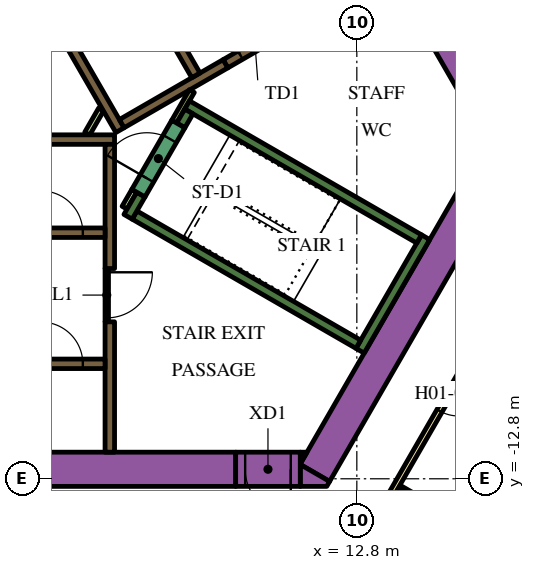
"""IFC4 building model, lengths in metres.
Left out: names, types, materials, properties, quantities, classifications, styles, units other than length and angle.
Written with IfcOpenShell. Run it as: python <this file> out.ifc"""

import sys

from ifc_helpers import new_model, si_unit, direction, frame, frame_2d, origin, place, context, subcontext, project, spatial, polyline, rectangle, outline, extrude, element, fill, save


model = new_model("IFC4")
c1 = context("Model", 3, precision=1e-05, world=origin(), true_north=direction((0.0, 1.0)))
c2 = subcontext(c1, "Body", "Model", "MODEL_VIEW")
j1 = project(units=[si_unit("LENGTHUNIT", "METRE"), si_unit("PLANEANGLEUNIT", "RADIAN")], contexts=[c1])
p1 = place(None, origin())
s1 = spatial("IfcSite", under=j1, at=p1, CompositionType="ELEMENT")
p2 = place(p1, origin())
s2 = spatial("IfcBuilding", under=s1, at=p2, CompositionType="ELEMENT")
p3 = place(p2, frame((0.0, 0.0, 35.4)))
s3 = spatial("IfcBuildingStorey", under=s2, at=p3, CompositionType="ELEMENT", Elevation=35.4)
p4 = place(p3, frame((6.711, 13.476, 0.0), z_axis=(0.0, 0.0, 1.0), x_axis=(0.500002723396, -0.866023831425, 0.0)))
e1 = element("IfcWall", 1, at=p4, inside=s3, PredefinedType="SOLIDWALL", context=c2, shape_type="SweptSolid", body=[
    extrude(rectangle(XDim=20.334, YDim=0.9, at=frame_2d((10.167, 0.0))), origin(), (0.0, 0.0, 1.0), 3.9),
])
p5 = place(p3, frame((11.695, -12.644, 0.0), z_axis=(0.0, 0.0, 1.0), x_axis=(0.500010229568, 0.86601949766, 0.0)))
e2 = element("IfcWall", 2, at=p5, inside=s3, PredefinedType="SOLIDWALL", context=c2, shape_type="SweptSolid", body=[
    extrude(rectangle(XDim=9.326, YDim=0.9, at=frame_2d((4.663, 0.0))), origin(), (0.0, 0.0, 1.0), 3.9),
])
p6 = place(p3, origin())
e3 = element("IfcWall", 3, at=p6, inside=s3, PredefinedType="SOLIDWALL", context=c2, shape_type="SweptSolid", body=[
    extrude(outline(polyline([(12.009, -13.0), (11.312, -13.0), (11.312, -12.425), (12.083, -12.871), (12.009, -13.0)])), origin(), (0.0, 0.0, 1.0), 3.9),
])
e4 = element("IfcWall", 4, at=p6, inside=s3, PredefinedType="SOLIDWALL", context=c2, shape_type="SweptSolid", body=[
    extrude(outline(polyline([(11.489, -12.1), (11.312, -12.407), (11.312, -12.1), (11.489, -12.1)])), origin(), (0.0, 0.0, 1.0), 3.9),
])
p7 = place(p3, frame((-12.019, -12.55, 0.0), z_axis=(0.0, 0.0, 1.0), x_axis=(1.0, 0.0, 0.0)))
e5 = element("IfcWall", 5, at=p7, inside=s3, PredefinedType="SOLIDWALL", context=c2, shape_type="SweptSolid", body=[
    extrude(rectangle(XDim=21.63, YDim=0.9, at=frame_2d((10.815, 0.0))), origin(), (0.0, 0.0, 1.0), 3.9),
])
p8 = place(p3, frame((12.885, -9.431, 0.0), z_axis=(0.0, 0.0, 1.0), x_axis=(0.500020560727, 0.866013532718, 0.0)))
e6 = element("IfcWall", 6, at=p8, inside=s3, PredefinedType="SOLIDWALL", context=c2, shape_type="SweptSolid", body=[
    extrude(rectangle(XDim=3.45, YDim=0.25, at=frame_2d((1.725, 0.0))), origin(), (0.0, 0.0, 1.0), 3.9),
])
p9 = place(p3, frame((12.84, -9.261, 0.0), z_axis=(0.0, 0.0, 1.0), x_axis=(-0.866013990052, 0.500019768644, 0.0)))
e7 = element("IfcWall", 7, at=p9, inside=s3, PredefinedType="SOLIDWALL", context=c2, shape_type="SweptSolid", body=[
    extrude(rectangle(XDim=6.8, YDim=0.25, at=frame_2d((3.4, 0.0))), origin(), (0.0, 0.0, 1.0), 3.9),
])
p10 = place(p3, frame((6.78, -5.906, 0.0), z_axis=(0.0, 0.0, 1.0), x_axis=(0.500223362819, 0.865896406789, 0.0)))
e8 = element("IfcWall", 8, at=p10, inside=s3, PredefinedType="SOLIDWALL", context=c2, shape_type="SweptSolid", body=[
    extrude(rectangle(XDim=0.675, YDim=0.25, at=frame_2d((0.337, 0.0))), origin(), (0.0, 0.0, 1.0), 3.9),
])
p11 = place(p3, frame((8.334, -2.964, 0.0), z_axis=(0.0, 0.0, 1.0), x_axis=(0.866016039709, -0.500016218704, 0.0)))
e9 = element("IfcWall", 9, at=p11, inside=s3, PredefinedType="SOLIDWALL", context=c2, shape_type="SweptSolid", body=[
    extrude(rectangle(XDim=7.05, YDim=0.25, at=frame_2d((3.525, 0.0))), origin(), (0.0, 0.0, 1.0), 3.9),
])
p12 = place(p3, frame((8.168, -3.503, 0.0), z_axis=(0.0, 0.0, 1.0), x_axis=(0.49972245349, 0.866185586049, 0.0)))
e10 = element("IfcWall", 10, at=p12, inside=s3, PredefinedType="SOLIDWALL", context=c2, shape_type="SweptSolid", body=[
    extrude(rectangle(XDim=0.425, YDim=0.25, at=frame_2d((0.212, 0.0))), origin(), (0.0, 0.0, 1.0), 3.9),
])
p13 = place(p3, frame((-5.545, -3.875, 0.0), z_axis=(0.0, 0.0, 1.0), x_axis=(1.0, 0.0, 0.0)))
e11 = element("IfcWall", 11, at=p13, inside=s3, PredefinedType="SOLIDWALL", context=c2, shape_type="SweptSolid", body=[
    extrude(rectangle(XDim=11.97, YDim=0.25, at=frame_2d((5.985, 0.0))), origin(), (0.0, 0.0, 1.0), 3.9),
])
p14 = place(p3, frame((6.3, -8.67, 0.0), z_axis=(0.0, 0.0, 1.0), x_axis=(0.0, -1.0, 0.0)))
e12 = element("IfcWall", 12, at=p14, inside=s3, PredefinedType="SOLIDWALL", context=c2, shape_type="SweptSolid", body=[
    extrude(rectangle(XDim=3.43, YDim=0.25, at=frame_2d((1.715, 0.0))), origin(), (0.0, 0.0, 1.0), 3.9),
])
p15 = place(p3, frame((6.3, -7.268, 0.0), z_axis=(0.0, 0.0, 1.0), x_axis=(0.0, 1.0, 0.0)))
e13 = element("IfcWall", 13, at=p15, inside=s3, PredefinedType="SOLIDWALL", context=c2, shape_type="SweptSolid", body=[
    extrude(rectangle(XDim=3.268, YDim=0.25, at=frame_2d((1.634, 0.0))), origin(), (0.0, 0.0, 1.0), 3.9),
])
e14 = element("IfcWall", 14, at=p6, inside=s3, PredefinedType="SOLIDWALL", context=c2, shape_type="SweptSolid", body=[
    extrude(outline(polyline([(0.566, 6.725), (0.566, 6.875), (0.566, 6.875), (0.565, 6.875), (0.361, 6.875), (0.035, 7.439), (0.252, 7.564), (0.377, 7.348), (6.552, -3.348), (6.677, -3.564), (6.46, -3.689), (0.448, 6.725), (0.565, 6.725), (0.566, 6.725), (0.566, 6.725)])), origin(), (0.0, 0.0, 1.0), 3.9),
])
p16 = place(p3, frame((6.614, -3.456, 0.0), z_axis=(0.0, 0.0, 1.0), x_axis=(0.86602447079, 0.500001615989, 0.0)))
e15 = element("IfcWall", 15, at=p16, inside=s3, PredefinedType="SOLIDWALL", context=c2, shape_type="SweptSolid", body=[
    extrude(rectangle(XDim=3.154, YDim=0.25, at=frame_2d((1.577, 0.0))), origin(), (0.0, 0.0, 1.0), 3.9),
])
p17 = place(p3, frame((6.945, -5.222, 0.0), z_axis=(0.0, 0.0, 1.0), x_axis=(-0.499818422106, -0.866130212453, 0.0)))
e16 = element("IfcWall", 16, at=p17, inside=s3, PredefinedType="PARTITIONING", context=c2, shape_type="SweptSolid", body=[
    extrude(rectangle(XDim=0.514, YDim=0.15, at=frame_2d((0.257, 0.0))), origin(), (0.0, 0.0, 1.0), 2.75),
])
p18 = place(p3, frame((5.705, -3.718, 0.0), z_axis=(0.0, 0.0, 1.0), x_axis=(0.499962090823, 0.866047289552, 0.0)))
e17 = element("IfcWall", 17, at=p18, inside=s3, PredefinedType="PARTITIONING", context=c2, shape_type="SweptSolid", body=[
    extrude(rectangle(XDim=0.735, YDim=0.15, at=frame_2d((0.367, 0.0))), origin(), (0.0, 0.0, 1.0), 2.75),
])
p19 = place(p3, frame((8.459, -2.599, 0.0), z_axis=(0.0, 0.0, 1.0), x_axis=(-0.500041054325, -0.866001699761, 0.0)))
e18 = element("IfcWall", 18, at=p19, inside=s3, PredefinedType="PARTITIONING", context=c2, shape_type="SweptSolid", body=[
    extrude(rectangle(XDim=0.929, YDim=0.15, at=frame_2d((0.464, 0.0))), origin(), (0.0, 0.0, 1.0), 3.9),
])
p20 = place(p3, frame((-6.175, -9.775, 0.0), z_axis=(0.0, 0.0, 1.0), x_axis=(1.0, 0.0, 0.0)))
e19 = element("IfcWall", 19, at=p20, inside=s3, PredefinedType="SOLIDWALL", context=c2, shape_type="SweptSolid", body=[
    extrude(rectangle(XDim=12.35, YDim=0.25, at=frame_2d((6.175, 0.0))), origin(), (0.0, 0.0, 1.0), 3.9),
])
p21 = place(p20, frame((0.585, 0.0, 0.0)))
e20 = element("IfcOpeningElement", 20, at=p21, cuts=e19, PredefinedType="OPENING", context=c2, shape_type="SweptSolid", body=[
    extrude(rectangle(XDim=1.1, YDim=2.1, at=frame_2d((0.55, 1.05))), frame((0.0, 0.135, 0.0), z_axis=(0.0, -1.0, 0.0), x_axis=(1.0, 0.0, 0.0)), (0.0, 0.0, 1.0), 0.27),
])
p22 = place(p20, frame((3.105, 0.0, 0.0)))
e21 = element("IfcOpeningElement", 21, at=p22, cuts=e19, PredefinedType="OPENING", context=c2, shape_type="SweptSolid", body=[
    extrude(rectangle(XDim=1.1, YDim=2.1, at=frame_2d((0.55, 1.05))), frame((0.0, 0.135, 0.0), z_axis=(0.0, -1.0, 0.0), x_axis=(1.0, 0.0, 0.0)), (0.0, 0.0, 1.0), 0.27),
])
p23 = place(p20, frame((5.625, 0.0, 0.0)))
e22 = element("IfcOpeningElement", 22, at=p23, cuts=e19, PredefinedType="OPENING", context=c2, shape_type="SweptSolid", body=[
    extrude(rectangle(XDim=1.1, YDim=2.1, at=frame_2d((0.55, 1.05))), frame((0.0, 0.135, 0.0), z_axis=(0.0, -1.0, 0.0), x_axis=(1.0, 0.0, 0.0)), (0.0, 0.0, 1.0), 0.27),
])
p24 = place(p20, frame((8.145, 0.0, 0.0)))
e23 = element("IfcOpeningElement", 23, at=p24, cuts=e19, PredefinedType="OPENING", context=c2, shape_type="SweptSolid", body=[
    extrude(rectangle(XDim=1.1, YDim=2.1, at=frame_2d((0.55, 1.05))), frame((0.0, 0.135, 0.0), z_axis=(0.0, -1.0, 0.0), x_axis=(1.0, 0.0, 0.0)), (0.0, 0.0, 1.0), 0.27),
])
p25 = place(p20, frame((10.665, 0.0, 0.0)))
e24 = element("IfcOpeningElement", 24, at=p25, cuts=e19, PredefinedType="OPENING", context=c2, shape_type="SweptSolid", body=[
    extrude(rectangle(XDim=1.1, YDim=2.1, at=frame_2d((0.55, 1.05))), frame((0.0, 0.135, 0.0), z_axis=(0.0, -1.0, 0.0), x_axis=(1.0, 0.0, 0.0)), (0.0, 0.0, 1.0), 0.27),
])
p26 = place(p3, frame((-6.175, -6.325, 0.0), z_axis=(0.0, 0.0, 1.0), x_axis=(1.0, 0.0, 0.0)))
e25 = element("IfcWall", 25, at=p26, inside=s3, PredefinedType="SOLIDWALL", context=c2, shape_type="SweptSolid", body=[
    extrude(rectangle(XDim=12.35, YDim=0.25, at=frame_2d((6.175, 0.0))), origin(), (0.0, 0.0, 1.0), 3.9),
])
p27 = place(p26, frame((3.205, 0.0, 0.0)))
e26 = element("IfcOpeningElement", 26, at=p27, cuts=e25, PredefinedType="OPENING", context=c2, shape_type="SweptSolid", body=[
    extrude(rectangle(XDim=0.9, YDim=2.1, at=frame_2d((0.45, 1.05))), frame((0.0, 0.135, 0.0), z_axis=(0.0, -1.0, 0.0), x_axis=(1.0, 0.0, 0.0)), (0.0, 0.0, 1.0), 0.27),
])
p28 = place(p26, frame((8.145, 0.0, 0.0)))
e27 = element("IfcOpeningElement", 27, at=p28, cuts=e25, PredefinedType="OPENING", context=c2, shape_type="SweptSolid", body=[
    extrude(rectangle(XDim=1.1, YDim=2.1, at=frame_2d((0.55, 1.05))), frame((0.0, 0.135, 0.0), z_axis=(0.0, -1.0, 0.0), x_axis=(1.0, 0.0, 0.0)), (0.0, 0.0, 1.0), 0.27),
])
p29 = place(p26, frame((10.665, 0.0, 0.0)))
e28 = element("IfcOpeningElement", 28, at=p29, cuts=e25, PredefinedType="OPENING", context=c2, shape_type="SweptSolid", body=[
    extrude(rectangle(XDim=1.1, YDim=2.1, at=frame_2d((0.55, 1.05))), frame((0.0, 0.135, 0.0), z_axis=(0.0, -1.0, 0.0), x_axis=(1.0, 0.0, 0.0)), (0.0, 0.0, 1.0), 0.27),
])
p30 = place(p3, frame((8.565, -2.185, 0.0), z_axis=(0.0, 0.0, 1.0), x_axis=(-0.499997954832, 0.866026584559, 0.0)))
e29 = element("IfcWall", 29, at=p30, inside=s3, PredefinedType="SOLIDWALL", context=c2, shape_type="SweptSolid", body=[
    extrude(rectangle(XDim=12.35, YDim=0.25, at=frame_2d((6.175, 0.0))), origin(), (0.0, 0.0, 1.0), 3.9),
])
p31 = place(p30, frame((5.725, 0.0, 0.0)))
e30 = element("IfcOpeningElement", 30, at=p31, cuts=e29, PredefinedType="OPENING", context=c2, shape_type="SweptSolid", body=[
    extrude(rectangle(XDim=0.9, YDim=2.1, at=frame_2d((0.45, 1.05))), frame((0.0, 0.135, 0.0), z_axis=(0.0, -1.0, 0.0), x_axis=(1.0, 0.0, 0.0)), (0.0, 0.0, 1.0), 0.27),
])
p32 = place(p3, frame((7.053, -5.284, 0.0), z_axis=(0.0, 0.0, 1.0), x_axis=(0.500078061341, 0.865980330357, 0.0)))
e31 = element("IfcWall", 31, at=p32, inside=s3, PredefinedType="SOLIDWALL", context=c2, shape_type="SweptSolid", body=[
    extrude(rectangle(XDim=2.1, YDim=0.4, at=frame_2d((1.05, 0.0))), origin(), (0.0, 0.0, 1.0), 3.9),
])
p33 = place(p32, frame((0.45, 0.0, 0.0)))
e32 = element("IfcOpeningElement", 32, at=p33, cuts=e31, PredefinedType="OPENING", context=c2, shape_type="SweptSolid", body=[
    extrude(rectangle(XDim=1.2, YDim=2.1, at=frame_2d((0.6, 1.05))), frame((0.0, 0.21, 0.0), z_axis=(0.0, -1.0, 0.0), x_axis=(1.0, 0.0, 0.0)), (0.0, 0.0, 1.0), 0.42),
])
p34 = place(p3, frame((9.346, -1.879, 0.0), z_axis=(0.0, 0.0, 1.0), x_axis=(0.866047807691, 0.499961193289, 0.0)))
e33 = element("IfcWall", 33, at=p34, inside=s3, PredefinedType="SOLIDWALL", context=c2, shape_type="SweptSolid", body=[
    extrude(rectangle(XDim=1.8, YDim=0.25, at=frame_2d((0.9, 0.0))), origin(), (0.0, 0.0, 1.0), 3.9),
])
p35 = place(p34, frame((0.45, 0.0, 0.0)))
e34 = element("IfcOpeningElement", 34, at=p35, cuts=e33, PredefinedType="OPENING", context=c2, shape_type="SweptSolid", body=[
    extrude(rectangle(XDim=0.9, YDim=2.1, at=frame_2d((0.45, 1.05))), frame((0.0, 0.135, 0.0), z_axis=(0.0, -1.0, 0.0), x_axis=(1.0, 0.0, 0.0)), (0.0, 0.0, 1.0), 0.27),
])
p36 = place(p3, frame((6.22, -7.266, 0.0), z_axis=(0.0, 0.0, 1.0), x_axis=(0.0, -1.0, 0.0)))
e35 = element("IfcWall", 35, at=p36, inside=s3, PredefinedType="PARTITIONING", context=c2, shape_type="SweptSolid", body=[
    extrude(rectangle(XDim=1.4, YDim=0.09, at=frame_2d((0.7, 0.0))), origin(), (0.0, 0.0, 1.0), 2.75),
])
p37 = place(p36, frame((0.1, 0.0, 0.0)))
e36 = element("IfcOpeningElement", 36, at=p37, cuts=e35, PredefinedType="OPENING", context=c2, shape_type="SweptSolid", body=[
    extrude(rectangle(XDim=1.2, YDim=2.1, at=frame_2d((0.6, 1.05))), frame((0.0, 0.055, 0.0), z_axis=(0.0, -1.0, 0.0), x_axis=(1.0, 0.0, 0.0)), (0.0, 0.0, 1.0), 0.11),
])
p38 = place(p3, frame((11.312, -12.55, 0.0), z_axis=(0.0, 0.0, 1.0), x_axis=(-1.0, 0.0, 0.0)))
e37 = element("IfcWall", 37, at=p38, inside=s3, PredefinedType="SOLIDWALL", context=c2, shape_type="SweptSolid", body=[
    extrude(rectangle(XDim=1.7, YDim=0.9, at=frame_2d((0.85, 0.0))), origin(), (0.0, 0.0, 1.0), 3.9),
])
p39 = place(p38, frame((0.25, 0.0, 0.0)))
e38 = element("IfcOpeningElement", 38, at=p39, cuts=e37, PredefinedType="OPENING", context=c2, shape_type="SweptSolid", body=[
    extrude(rectangle(XDim=1.2, YDim=2.1, at=frame_2d((0.6, 1.05))), frame((0.0, 0.46, 0.0), z_axis=(0.0, -1.0, 0.0), x_axis=(1.0, 0.0, 0.0)), (0.0, 0.0, 1.0), 0.92),
])
p40 = place(p3, frame((6.163, 18.475, 0.0), z_axis=(0.0, 0.0, 1.0), x_axis=(0.500001317485, -0.866024643133, 0.0)))
e39 = element("IfcWall", 39, at=p40, inside=s3, PredefinedType="PARTITIONING", context=c2, shape_type="SweptSolid", body=[
    extrude(rectangle(XDim=25.767, YDim=0.15, at=frame_2d((12.883, 0.0))), origin(), (0.0, 0.0, 1.0), 2.75),
])
p41 = place(p40, frame((24.586, 0.0, 0.0)))
e40 = element("IfcOpeningElement", 40, at=p41, cuts=e39, PredefinedType="OPENING", context=c2, shape_type="SweptSolid", body=[
    extrude(rectangle(XDim=1.0, YDim=2.1, at=frame_2d((0.5, 1.05))), frame((0.0, 0.085, 0.0), z_axis=(0.0, -1.0, 0.0), x_axis=(1.0, 0.0, 0.0)), (0.0, 0.0, 1.0), 0.17),
])
p42 = place(p40, frame((19.319, 0.0, 0.0)))
e41 = element("IfcOpeningElement", 41, at=p42, cuts=e39, PredefinedType="OPENING", context=c2, shape_type="SweptSolid", body=[
    extrude(rectangle(XDim=1.0, YDim=2.1, at=frame_2d((0.5, 1.05))), frame((0.0, 0.085, 0.0), z_axis=(0.0, -1.0, 0.0), x_axis=(1.0, 0.0, 0.0)), (0.0, 0.0, 1.0), 0.17),
])
p43 = place(p40, frame((18.012, 0.0, 0.0)))
e42 = element("IfcOpeningElement", 42, at=p43, cuts=e39, PredefinedType="OPENING", context=c2, shape_type="SweptSolid", body=[
    extrude(rectangle(XDim=1.0, YDim=2.1, at=frame_2d((0.5, 1.05))), frame((0.0, 0.085, 0.0), z_axis=(0.0, -1.0, 0.0), x_axis=(1.0, 0.0, 0.0)), (0.0, 0.0, 1.0), 0.17),
])
p44 = place(p40, frame((6.824, 0.0, 0.0)))
e43 = element("IfcOpeningElement", 43, at=p44, cuts=e39, PredefinedType="OPENING", context=c2, shape_type="SweptSolid", body=[
    extrude(rectangle(XDim=1.1, YDim=2.1, at=frame_2d((0.55, 1.05))), frame((0.0, 0.085, 0.0), z_axis=(0.0, -1.0, 0.0), x_axis=(1.0, 0.0, 0.0)), (0.0, 0.0, 1.0), 0.17),
])
p45 = place(p40, frame((4.658, 0.0, 0.0)))
e44 = element("IfcOpeningElement", 44, at=p45, cuts=e39, PredefinedType="OPENING", context=c2, shape_type="SweptSolid", body=[
    extrude(rectangle(XDim=0.9, YDim=2.1, at=frame_2d((0.45, 1.05))), frame((0.0, 0.085, 0.0), z_axis=(0.0, -1.0, 0.0), x_axis=(1.0, 0.0, 0.0)), (0.0, 0.0, 1.0), 0.17),
])
p46 = place(p40, frame((0.18, 0.0, 0.0)))
e45 = element("IfcOpeningElement", 45, at=p46, cuts=e39, PredefinedType="OPENING", context=c2, shape_type="SweptSolid", body=[
    extrude(rectangle(XDim=1.0, YDim=2.1, at=frame_2d((0.5, 1.05))), frame((0.0, 0.085, 0.0), z_axis=(0.0, -1.0, 0.0), x_axis=(1.0, 0.0, 0.0)), (0.0, 0.0, 1.0), 0.17),
])
p47 = place(p3, frame((15.587, -9.952, 0.0), z_axis=(0.0, 0.0, 1.0), x_axis=(-0.500016618951, -0.866015808616, 0.0)))
e46 = element("IfcWall", 46, at=p47, inside=s3, PredefinedType="PARTITIONING", context=c2, shape_type="SweptSolid", body=[
    extrude(rectangle(XDim=5.268, YDim=0.15, at=frame_2d((2.634, 0.0))), origin(), (0.0, 0.0, 1.0), 2.75),
])
p48 = place(p47, frame((0.225, 0.0, 0.0)))
e47 = element("IfcOpeningElement", 47, at=p48, cuts=e46, PredefinedType="OPENING", context=c2, shape_type="SweptSolid", body=[
    extrude(rectangle(XDim=1.0, YDim=2.1, at=frame_2d((0.5, 1.05))), frame((0.0, 0.085, 0.0), z_axis=(0.0, -1.0, 0.0), x_axis=(1.0, 0.0, 0.0)), (0.0, 0.0, 1.0), 0.17),
])
p49 = place(p3, frame((16.16, -14.31, 0.0), z_axis=(0.0, 0.0, 1.0), x_axis=(-0.866062058628, 0.499936506574, 0.0)))
e48 = element("IfcWall", 48, at=p49, inside=s3, PredefinedType="PARTITIONING", context=c2, shape_type="SweptSolid", body=[
    extrude(rectangle(XDim=2.6, YDim=0.1, at=frame_2d((1.3, 0.0))), origin(), (0.0, 0.0, 1.0), 2.75),
])
p50 = place(p49, frame((1.1, 0.0, 0.0)))
e49 = element("IfcOpeningElement", 49, at=p50, cuts=e48, PredefinedType="OPENING", context=c2, shape_type="SweptSolid", body=[
    extrude(rectangle(XDim=0.9, YDim=2.1, at=frame_2d((0.45, 1.05))), frame((0.0, 0.06, 0.0), z_axis=(0.0, -1.0, 0.0), x_axis=(1.0, 0.0, 0.0)), (0.0, 0.0, 1.0), 0.12),
])
p51 = place(p25, origin())
e50 = element("IfcDoor", 50, at=p51, inside=s3, OperationType="DOUBLE_DOOR_SLIDING", PredefinedType="DOOR", context=c2, shape_type="SweptSolid", body=[
    extrude(rectangle(XDim=1.1, YDim=2.1, at=frame_2d((0.55, 1.05))), frame((0.0, 0.025, 0.0), z_axis=(0.0, -1.0, 0.0), x_axis=(1.0, 0.0, 0.0)), (0.0, 0.0, 1.0), 0.05),
])
fill(e24, e50)
p52 = place(p29, origin())
e51 = element("IfcDoor", 51, at=p52, inside=s3, OperationType="DOUBLE_DOOR_SLIDING", PredefinedType="DOOR", context=c2, shape_type="SweptSolid", body=[
    extrude(rectangle(XDim=1.1, YDim=2.1, at=frame_2d((0.55, 1.05))), frame((0.0, 0.025, 0.0), z_axis=(0.0, -1.0, 0.0), x_axis=(1.0, 0.0, 0.0)), (0.0, 0.0, 1.0), 0.05),
])
fill(e28, e51)
p53 = place(p33, origin())
e52 = element("IfcDoor", 52, at=p53, inside=s3, OperationType="SINGLE_SWING_LEFT", PredefinedType="DOOR", context=c2, shape_type="SweptSolid", body=[
    extrude(rectangle(XDim=1.2, YDim=2.1, at=frame_2d((0.6, 1.05))), frame((0.0, 0.025, 0.0), z_axis=(0.0, -1.0, 0.0), x_axis=(1.0, 0.0, 0.0)), (0.0, 0.0, 1.0), 0.05),
])
fill(e32, e52)
p54 = place(p35, origin())
e53 = element("IfcDoor", 53, at=p54, inside=s3, OperationType="SINGLE_SWING_LEFT", PredefinedType="DOOR", context=c2, shape_type="SweptSolid", body=[
    extrude(rectangle(XDim=0.9, YDim=2.1, at=frame_2d((0.45, 1.05))), frame((0.0, 0.025, 0.0), z_axis=(0.0, -1.0, 0.0), x_axis=(1.0, 0.0, 0.0)), (0.0, 0.0, 1.0), 0.05),
])
fill(e34, e53)
p55 = place(p37, origin())
e54 = element("IfcDoor", 54, at=p55, inside=s3, OperationType="SINGLE_SWING_LEFT", PredefinedType="DOOR", context=c2, shape_type="SweptSolid", body=[
    extrude(rectangle(XDim=1.2, YDim=2.1, at=frame_2d((0.6, 1.05))), frame((0.0, 0.025, 0.0), z_axis=(0.0, -1.0, 0.0), x_axis=(1.0, 0.0, 0.0)), (0.0, 0.0, 1.0), 0.05),
])
fill(e36, e54)
p56 = place(p39, origin())
e55 = element("IfcDoor", 55, at=p56, inside=s3, OperationType="SINGLE_SWING_LEFT", PredefinedType="DOOR", context=c2, shape_type="SweptSolid", body=[
    extrude(rectangle(XDim=1.2, YDim=2.1, at=frame_2d((0.6, 1.05))), frame((0.0, 0.025, 0.0), z_axis=(0.0, -1.0, 0.0), x_axis=(1.0, 0.0, 0.0)), (0.0, 0.0, 1.0), 0.05),
])
fill(e38, e55)
p57 = place(p48, origin())
e56 = element("IfcDoor", 56, at=p57, inside=s3, OperationType="SINGLE_SWING_LEFT", PredefinedType="DOOR", context=c2, shape_type="SweptSolid", body=[
    extrude(rectangle(XDim=1.0, YDim=2.1, at=frame_2d((0.5, 1.05))), frame((0.0, 0.025, 0.0), z_axis=(0.0, -1.0, 0.0), x_axis=(1.0, 0.0, 0.0)), (0.0, 0.0, 1.0), 0.05),
])
fill(e47, e56)
save(model, sys.argv[1])
